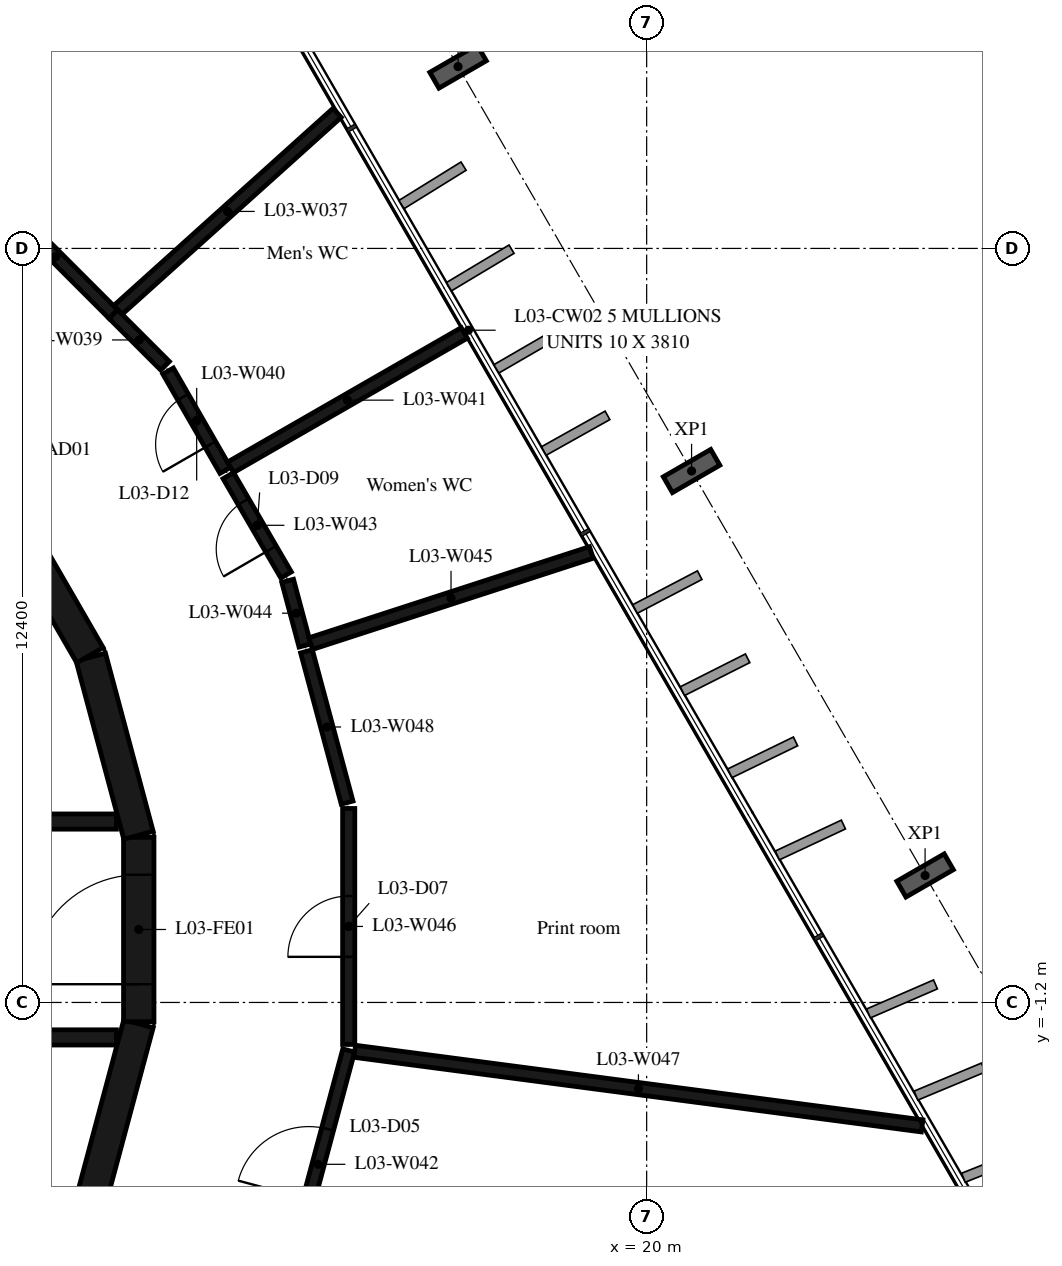
"""IFC4 building model, lengths in metres.
Left out: names, types, materials, properties, quantities, classifications, styles, units other than length and angle.
Written with IfcOpenShell. Run it as: python <this file> out.ifc"""

import sys

from ifc_helpers import new_model, si_unit, direction, frame, frame_2d, origin, origin_2d, place, context, subcontext, project, spatial, rectangle, i_section, extrude, element, fill, save


model = new_model("IFC4")
c1 = context("Model", 3, precision=1e-05, world=origin(), true_north=direction((0.0, 1.0)))
c2 = subcontext(c1, "Body", "Model", "MODEL_VIEW")
j1 = project(units=[si_unit("LENGTHUNIT", "METRE"), si_unit("PLANEANGLEUNIT", "RADIAN")], contexts=[c1])
p1 = place(None, origin())
s1 = spatial("IfcSite", under=j1, at=p1, CompositionType="ELEMENT")
p2 = place(p1, origin())
s2 = spatial("IfcBuilding", under=s1, at=p2, CompositionType="ELEMENT")
p3 = place(p2, frame((0.0, 0.0, 18.6)))
s3 = spatial("IfcBuildingStorey", under=s2, at=p3, CompositionType="ELEMENT", Elevation=18.6)
for number, where, z_axis, x_axis in (
    (1, (24.579, 0.888, -0.38), (0.0, 0.0, 1.0), (0.5, -0.866, 0.0)),
    (2, (20.739, 7.539, -0.38), (0.0, 0.0, 1.0), (0.5, -0.866, 0.0)),
    (3, (16.899, 14.19, -0.38), (0.0, 0.0, 1.0), (0.5, -0.866, 0.0)),
):
    element("IfcColumn", number, at=place(p3, frame(where, z_axis=z_axis, x_axis=x_axis)), inside=s3, PredefinedType="COLUMN", context=c2, shape_type="SweptSolid", body=[
        extrude(i_section(OverallWidth=0.3, OverallDepth=0.9, WebThickness=0.019, FlangeThickness=0.035, FilletRadius=0.03, at=origin_2d()), origin(), (0.0, 0.0, 1.0), 4.8),
    ])
p4 = place(p3, frame((10.858, -4.479, 0.0), z_axis=(0.0, 0.0, 1.0), x_axis=(0.258734743916, 0.965948410781, 0.0)))
e4 = element("IfcWall", 4, at=p4, inside=s3, PredefinedType="SHEAR", context=c2, shape_type="SweptSolid", body=[
    extrude(rectangle(XDim=3.033, YDim=0.5, at=frame_2d((1.516, 0.0))), origin(), (0.0, 0.0, 1.0), 4.42),
])
p5 = place(p3, frame((11.647, -1.516, 0.0), z_axis=(0.0, 0.0, 1.0), x_axis=(0.0, 1.0, 0.0)))
e5 = element("IfcWall", 5, at=p5, inside=s3, PredefinedType="SHEAR", context=c2, shape_type="SweptSolid", body=[
    extrude(rectangle(XDim=3.033, YDim=0.5, at=frame_2d((1.516, 0.0))), origin(), (0.0, 0.0, 1.0), 4.42),
])
p6 = place(p5, frame((0.616, 0.0, 0.0)))
e6 = element("IfcOpeningElement", 6, at=p6, cuts=e5, PredefinedType="OPENING", context=c2, shape_type="SweptSolid", body=[
    extrude(rectangle(XDim=1.8, YDim=2.1, at=frame_2d((0.9, 1.05))), frame((0.0, 0.26, 0.0), z_axis=(0.0, -1.0, 0.0), x_axis=(1.0, 0.0, 0.0)), (0.0, 0.0, 1.0), 0.52),
])
for number, where, z_axis, x_axis in (
    (7, (11.643, 1.55, 0.0), (0.0, 0.0, 1.0), (-0.259, 0.966, 0.0)),
    (8, (10.845, 4.51, 0.0), (0.0, 0.0, 1.0), (-0.5, 0.866, 0.0)),
):
    element("IfcWall", number, at=place(p3, frame(where, z_axis=z_axis, x_axis=x_axis)), inside=s3, PredefinedType="SHEAR", context=c2, shape_type="SweptSolid", body=[
        extrude(rectangle(XDim=3.033, YDim=0.5, at=frame_2d((1.516, 0.0))), origin(), (0.0, 0.0, 1.0), 4.42),
    ])
p7 = place(p3, frame((3.35, 1.775, 0.0), z_axis=(0.0, 0.0, 1.0), x_axis=(1.0, 0.0, 0.0)))
e9 = element("IfcWall", 9, at=p7, inside=s3, PredefinedType="SHEAR", context=c2, shape_type="SweptSolid", body=[
    extrude(rectangle(XDim=7.93, YDim=0.25, at=frame_2d((3.965, 0.0))), origin(), (0.0, 0.0, 1.0), 4.42),
])
p8 = place(p7, frame((0.35, 0.0, 0.0)))
e10 = element("IfcOpeningElement", 10, at=p8, cuts=e9, PredefinedType="OPENING", context=c2, shape_type="SweptSolid", body=[
    extrude(rectangle(XDim=1.2, YDim=2.4, at=frame_2d((0.6, 1.2))), frame((0.0, 0.135, 0.0), z_axis=(0.0, -1.0, 0.0), x_axis=(1.0, 0.0, 0.0)), (0.0, 0.0, 1.0), 0.27),
])
p9 = place(p7, frame((2.5, 0.0, 0.0)))
e11 = element("IfcOpeningElement", 11, at=p9, cuts=e9, PredefinedType="OPENING", context=c2, shape_type="SweptSolid", body=[
    extrude(rectangle(XDim=1.2, YDim=2.4, at=frame_2d((0.6, 1.2))), frame((0.0, 0.135, 0.0), z_axis=(0.0, -1.0, 0.0), x_axis=(1.0, 0.0, 0.0)), (0.0, 0.0, 1.0), 0.27),
])
p10 = place(p7, frame((4.8, 0.0, 0.0)))
e12 = element("IfcOpeningElement", 12, at=p10, cuts=e9, PredefinedType="OPENING", context=c2, shape_type="SweptSolid", body=[
    extrude(rectangle(XDim=0.9, YDim=2.1, at=frame_2d((0.45, 1.05))), frame((0.0, 0.135, 0.0), z_axis=(0.0, -1.0, 0.0), x_axis=(1.0, 0.0, 0.0)), (0.0, 0.0, 1.0), 0.27),
])
p11 = place(p3, frame((3.35, -1.775, 0.0), z_axis=(0.0, 0.0, 1.0), x_axis=(1.0, 0.0, 0.0)))
e13 = element("IfcWall", 13, at=p11, inside=s3, PredefinedType="SHEAR", context=c2, shape_type="SweptSolid", body=[
    extrude(rectangle(XDim=7.93, YDim=0.25, at=frame_2d((3.965, 0.0))), origin(), (0.0, 0.0, 1.0), 4.42),
])
p12 = place(p11, frame((0.4, 0.0, 0.0)))
e14 = element("IfcOpeningElement", 14, at=p12, cuts=e13, PredefinedType="OPENING", context=c2, shape_type="SweptSolid", body=[
    extrude(rectangle(XDim=1.1, YDim=2.4, at=frame_2d((0.55, 1.2))), frame((0.0, 0.135, 0.0), z_axis=(0.0, -1.0, 0.0), x_axis=(1.0, 0.0, 0.0)), (0.0, 0.0, 1.0), 0.27),
])
p13 = place(p11, frame((2.55, 0.0, 0.0)))
e15 = element("IfcOpeningElement", 15, at=p13, cuts=e13, PredefinedType="OPENING", context=c2, shape_type="SweptSolid", body=[
    extrude(rectangle(XDim=1.1, YDim=2.4, at=frame_2d((0.55, 1.2))), frame((0.0, 0.135, 0.0), z_axis=(0.0, -1.0, 0.0), x_axis=(1.0, 0.0, 0.0)), (0.0, 0.0, 1.0), 0.27),
])
p14 = place(p11, frame((4.7, 0.0, 0.0)))
e16 = element("IfcOpeningElement", 16, at=p14, cuts=e13, PredefinedType="OPENING", context=c2, shape_type="SweptSolid", body=[
    extrude(rectangle(XDim=1.1, YDim=2.4, at=frame_2d((0.55, 1.2))), frame((0.0, 0.135, 0.0), z_axis=(0.0, -1.0, 0.0), x_axis=(1.0, 0.0, 0.0)), (0.0, 0.0, 1.0), 0.27),
])
p15 = place(p3, frame((11.23, 10.12, 0.0), z_axis=(0.0, 0.0, 1.0), x_axis=(-0.707106781187, 0.707106781187, 0.0)))
e17 = element("IfcWall", 17, at=p15, inside=s3, PredefinedType="PARTITIONING", context=c2, shape_type="SweptSolid", body=[
    extrude(rectangle(XDim=2.672, YDim=0.2, at=frame_2d((1.336, 0.0))), origin(), (0.0, 0.0, 1.0), 4.42),
])
p16 = place(p3, frame((11.304, 10.187, 0.0), z_axis=(0.0, 0.0, 1.0), x_axis=(0.743474354937, 0.668764445489, 0.0)))
e18 = element("IfcWall", 18, at=p16, inside=s3, PredefinedType="PARTITIONING", context=c2, shape_type="SweptSolid", body=[
    extrude(rectangle(XDim=4.849, YDim=0.2, at=frame_2d((2.425, 0.0))), origin(), (0.0, 0.0, 1.0), 4.03),
])
p17 = place(p3, frame((12.08, 9.27, 0.0), z_axis=(0.0, 0.0, 1.0), x_axis=(-0.707106781187, 0.707106781187, 0.0)))
e19 = element("IfcWall", 19, at=p17, inside=s3, PredefinedType="PARTITIONING", context=c2, shape_type="SweptSolid", body=[
    extrude(rectangle(XDim=1.202, YDim=0.2, at=frame_2d((0.601, 0.0))), origin(), (0.0, 0.0, 1.0), 4.42),
])
p18 = place(p3, frame((13.07, 7.55, 0.0), z_axis=(0.0, 0.0, 1.0), x_axis=(-0.498884838469, 0.866668285993, 0.0)))
e20 = element("IfcWall", 20, at=p18, inside=s3, PredefinedType="PARTITIONING", context=c2, shape_type="SweptSolid", body=[
    extrude(rectangle(XDim=1.885, YDim=0.2, at=frame_2d((0.942, 0.0))), origin(), (0.0, 0.0, 1.0), 4.42),
])
p19 = place(p18, frame((0.492, 0.0, 0.0)))
e21 = element("IfcOpeningElement", 21, at=p19, cuts=e20, PredefinedType="OPENING", context=c2, shape_type="SweptSolid", body=[
    extrude(rectangle(XDim=0.9, YDim=2.1, at=frame_2d((0.45, 1.05))), frame((0.0, 0.11, 0.0), z_axis=(0.0, -1.0, 0.0), x_axis=(1.0, 0.0, 0.0)), (0.0, 0.0, 1.0), 0.22),
])
p20 = place(p3, frame((13.157, 7.6, 0.0), z_axis=(0.0, 0.0, 1.0), x_axis=(0.866874176334, 0.498526992654, 0.0)))
e22 = element("IfcWall", 22, at=p20, inside=s3, PredefinedType="PARTITIONING", context=c2, shape_type="SweptSolid", body=[
    extrude(rectangle(XDim=4.433, YDim=0.2, at=frame_2d((2.217, 0.0))), origin(), (0.0, 0.0, 1.0), 4.42),
])
p21 = place(p3, frame((14.096, -5.733, 0.0), z_axis=(0.0, 0.0, 1.0), x_axis=(0.259085569159, 0.96585437197, 0.0)))
e23 = element("IfcWall", 23, at=p21, inside=s3, PredefinedType="PARTITIONING", context=c2, shape_type="SweptSolid", body=[
    extrude(rectangle(XDim=3.876, YDim=0.2, at=frame_2d((1.938, 0.0))), origin(), (0.0, 0.0, 1.0), 4.42),
])
p22 = place(p21, frame((1.338, 0.0, 0.0)))
e24 = element("IfcOpeningElement", 24, at=p22, cuts=e23, PredefinedType="OPENING", context=c2, shape_type="SweptSolid", body=[
    extrude(rectangle(XDim=1.2, YDim=2.1, at=frame_2d((0.6, 1.05))), frame((0.0, 0.11, 0.0), z_axis=(0.0, -1.0, 0.0), x_axis=(1.0, 0.0, 0.0)), (0.0, 0.0, 1.0), 0.22),
])
p23 = place(p3, frame((14.07, 5.83, 0.0), z_axis=(0.0, 0.0, 1.0), x_axis=(-0.502609228887, 0.864513714777, 0.0)))
e25 = element("IfcWall", 25, at=p23, inside=s3, PredefinedType="PARTITIONING", context=c2, shape_type="SweptSolid", body=[
    extrude(rectangle(XDim=1.89, YDim=0.2, at=frame_2d((0.945, 0.0))), origin(), (0.0, 0.0, 1.0), 4.42),
])
p24 = place(p23, frame((0.495, 0.0, 0.0)))
e26 = element("IfcOpeningElement", 26, at=p24, cuts=e25, PredefinedType="OPENING", context=c2, shape_type="SweptSolid", body=[
    extrude(rectangle(XDim=0.9, YDim=2.1, at=frame_2d((0.45, 1.05))), frame((0.0, 0.11, 0.0), z_axis=(0.0, -1.0, 0.0), x_axis=(1.0, 0.0, 0.0)), (0.0, 0.0, 1.0), 0.22),
])
p25 = place(p3, frame((14.38, 4.67, 0.0), z_axis=(0.0, 0.0, 1.0), x_axis=(-0.258159565639, 0.966102292032, 0.0)))
e27 = element("IfcWall", 27, at=p25, inside=s3, PredefinedType="PARTITIONING", context=c2, shape_type="SweptSolid", body=[
    extrude(rectangle(XDim=1.101, YDim=0.2, at=frame_2d((0.55, 0.0))), origin(), (0.0, 0.0, 1.0), 4.42),
])
p26 = place(p3, frame((14.475, 4.701, 0.0), z_axis=(0.0, 0.0, 1.0), x_axis=(0.951085450377, 0.308927930239, 0.0)))
e28 = element("IfcWall", 28, at=p26, inside=s3, PredefinedType="PARTITIONING", context=c2, shape_type="SweptSolid", body=[
    extrude(rectangle(XDim=4.852, YDim=0.2, at=frame_2d((2.426, 0.0))), origin(), (0.0, 0.0, 1.0), 4.03),
])
p27 = place(p3, frame((15.1, -1.89, 0.0), z_axis=(0.0, 0.0, 1.0), x_axis=(0.0, 1.0, 0.0)))
e29 = element("IfcWall", 29, at=p27, inside=s3, PredefinedType="PARTITIONING", context=c2, shape_type="SweptSolid", body=[
    extrude(rectangle(XDim=3.88, YDim=0.2, at=frame_2d((1.94, 0.0))), origin(), (0.0, 0.0, 1.0), 4.42),
])
p28 = place(p27, frame((1.44, 0.0, 0.0)))
e30 = element("IfcOpeningElement", 30, at=p28, cuts=e29, PredefinedType="OPENING", context=c2, shape_type="SweptSolid", body=[
    extrude(rectangle(XDim=1.0, YDim=2.1, at=frame_2d((0.5, 1.05))), frame((0.0, 0.11, 0.0), z_axis=(0.0, -1.0, 0.0), x_axis=(1.0, 0.0, 0.0)), (0.0, 0.0, 1.0), 0.22),
])
p29 = place(p3, frame((15.199, -2.003, 0.0), z_axis=(0.0, 0.0, 1.0), x_axis=(0.991463740717, -0.130382709146, 0.0)))
e31 = element("IfcWall", 31, at=p29, inside=s3, PredefinedType="PARTITIONING", context=c2, shape_type="SweptSolid", body=[
    extrude(rectangle(XDim=9.411, YDim=0.2, at=frame_2d((4.706, 0.0))), origin(), (0.0, 0.0, 1.0), 4.42),
])
p30 = place(p3, frame((15.074, 2.087, 0.0), z_axis=(0.0, 0.0, 1.0), x_axis=(-0.259408996071, 0.965767556277, 0.0)))
e32 = element("IfcWall", 32, at=p30, inside=s3, PredefinedType="PARTITIONING", context=c2, shape_type="SweptSolid", body=[
    extrude(rectangle(XDim=2.575, YDim=0.2, at=frame_2d((1.288, 0.0))), origin(), (0.0, 0.0, 1.0), 4.42),
])
p31 = place(p6, origin())
e33 = element("IfcDoor", 33, at=p31, inside=s3, OperationType="DOUBLE_DOOR_SINGLE_SWING", PredefinedType="DOOR", context=c2, shape_type="SweptSolid", body=[
    extrude(rectangle(XDim=1.8, YDim=2.1, at=frame_2d((0.9, 1.05))), frame((0.0, 0.025, 0.0), z_axis=(0.0, -1.0, 0.0), x_axis=(1.0, 0.0, 0.0)), (0.0, 0.0, 1.0), 0.05),
])
fill(e6, e33)
p32 = place(p22, origin())
e34 = element("IfcDoor", 34, at=p32, inside=s3, OperationType="SINGLE_SWING_LEFT", PredefinedType="DOOR", context=c2, shape_type="SweptSolid", body=[
    extrude(rectangle(XDim=1.2, YDim=2.1, at=frame_2d((0.6, 1.05))), frame((0.0, 0.025, 0.0), z_axis=(0.0, -1.0, 0.0), x_axis=(1.0, 0.0, 0.0)), (0.0, 0.0, 1.0), 0.05),
])
fill(e24, e34)
p33 = place(p28, origin())
e35 = element("IfcDoor", 35, at=p33, inside=s3, OperationType="SINGLE_SWING_LEFT", PredefinedType="DOOR", context=c2, shape_type="SweptSolid", body=[
    extrude(rectangle(XDim=1.0, YDim=2.1, at=frame_2d((0.5, 1.05))), frame((0.0, 0.025, 0.0), z_axis=(0.0, -1.0, 0.0), x_axis=(1.0, 0.0, 0.0)), (0.0, 0.0, 1.0), 0.05),
])
fill(e30, e35)
p34 = place(p24, origin())
e36 = element("IfcDoor", 36, at=p34, inside=s3, OperationType="SINGLE_SWING_LEFT", PredefinedType="DOOR", context=c2, shape_type="SweptSolid", body=[
    extrude(rectangle(XDim=0.9, YDim=2.1, at=frame_2d((0.45, 1.05))), frame((0.0, 0.025, 0.0), z_axis=(0.0, -1.0, 0.0), x_axis=(1.0, 0.0, 0.0)), (0.0, 0.0, 1.0), 0.05),
])
fill(e26, e36)
p35 = place(p19, origin())
e37 = element("IfcDoor", 37, at=p35, inside=s3, OperationType="SINGLE_SWING_LEFT", PredefinedType="DOOR", context=c2, shape_type="SweptSolid", body=[
    extrude(rectangle(XDim=0.9, YDim=2.1, at=frame_2d((0.45, 1.05))), frame((0.0, 0.025, 0.0), z_axis=(0.0, -1.0, 0.0), x_axis=(1.0, 0.0, 0.0)), (0.0, 0.0, 1.0), 0.05),
])
fill(e21, e37)
save(model, sys.argv[1])
